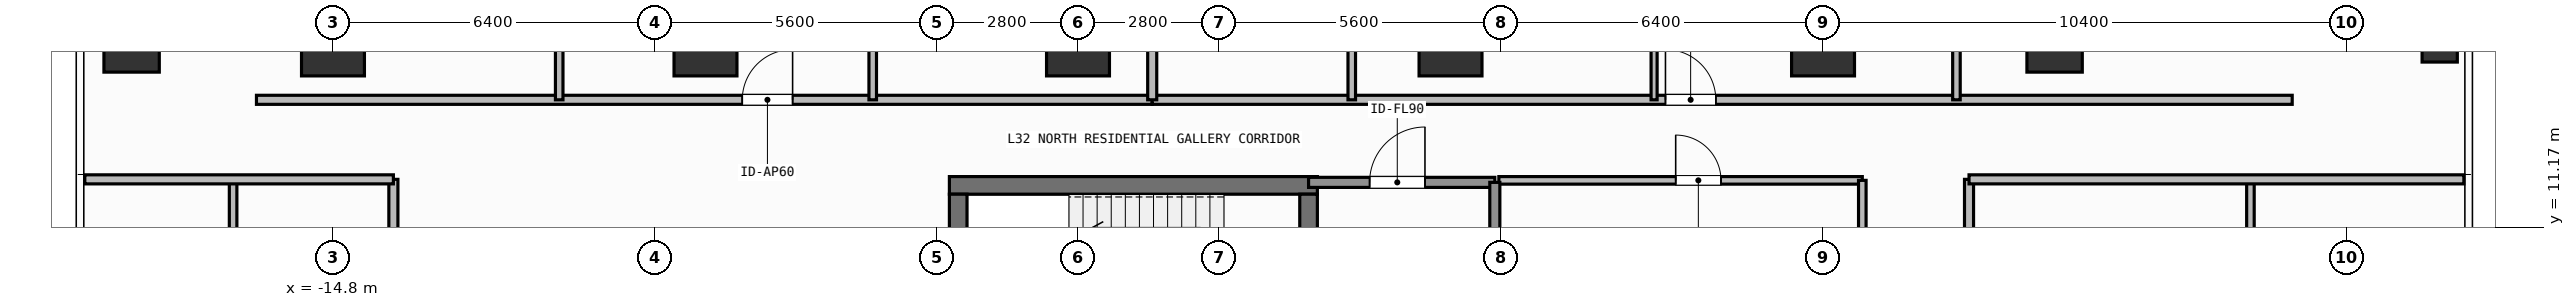
"""IFC4 building model, lengths in metres.
Left out: names, types, materials, properties, quantities, classifications, styles, units other than length and angle.
Written with IfcOpenShell. Run it as: python <this file> out.ifc"""

import sys

from ifc_helpers import new_model, si_unit, direction, frame, frame_2d, origin, origin_2d, place, context, subcontext, project, spatial, rectangle, hollow_rectangle, extrude, element, fill, save


model = new_model("IFC4")
c1 = context("Model", 3, precision=1e-05, world=origin(), true_north=direction((0.0, 1.0)))
c2 = subcontext(c1, "Body", "Model", "MODEL_VIEW")
j1 = project(units=[si_unit("LENGTHUNIT", "METRE"), si_unit("PLANEANGLEUNIT", "RADIAN")], contexts=[c1])
p1 = place(None, origin())
s1 = spatial("IfcSite", under=j1, at=p1, CompositionType="ELEMENT")
p2 = place(p1, origin())
s2 = spatial("IfcBuilding", under=s1, at=p2, CompositionType="ELEMENT")
p3 = place(p2, frame((0.0, 0.0, 129.0)))
s3 = spatial("IfcBuildingStorey", under=s2, at=p3, CompositionType="ELEMENT", Elevation=129.0)
p4 = place(p3, frame((-2.555, 12.0, 0.0), z_axis=(0.0, 0.0, 1.0), x_axis=(1.0, 0.0, 0.0)))
e1 = element("IfcWall", 1, at=p4, inside=s3, PredefinedType="SHEAR", context=c2, shape_type="SweptSolid", body=[
    extrude(rectangle(XDim=7.31, YDim=0.35, at=frame_2d((3.655, 0.0))), origin(), (0.0, 0.0, 1.0), 3.9),
])
p5 = place(p3, frame((-2.38, 8.9, 0.0), z_axis=(0.0, 0.0, 1.0), x_axis=(0.0, 1.0, 0.0)))
e2 = element("IfcWall", 2, at=p5, inside=s3, PredefinedType="SHEAR", context=c2, shape_type="SweptSolid", body=[
    extrude(rectangle(XDim=2.925, YDim=0.35, at=frame_2d((1.462, 0.0))), origin(), (0.0, 0.0, 1.0), 3.9),
])
p6 = place(p3, frame((4.58, 11.825, 0.0), z_axis=(0.0, 0.0, 1.0), x_axis=(0.0, -1.0, 0.0)))
e3 = element("IfcWall", 3, at=p6, inside=s3, PredefinedType="SHEAR", context=c2, shape_type="SweptSolid", body=[
    extrude(rectangle(XDim=2.925, YDim=0.35, at=frame_2d((1.462, 0.0))), origin(), (0.0, 0.0, 1.0), 3.9),
])
p7 = place(p6, frame((0.913, 0.0, 0.0)))
e4 = element("IfcOpeningElement", 4, at=p7, cuts=e3, PredefinedType="OPENING", context=c2, shape_type="SweptSolid", body=[
    extrude(rectangle(XDim=1.1, YDim=2.15, at=frame_2d((0.55, 1.075))), frame((0.0, 0.185, 0.0), z_axis=(0.0, -1.0, 0.0), x_axis=(1.0, 0.0, 0.0)), (0.0, 0.0, 1.0), 0.37),
])
for number, where, z_axis, x_axis in (
    (5, (-14.8, 14.8, 0.0), (0.0, 0.0, 1.0), (1.0, 0.0, 0.0)),
    (6, (-7.4, 14.8, 0.0), (0.0, 0.0, 1.0), (1.0, 0.0, 0.0)),
    (7, (0.0, 14.8, 0.0), (0.0, 0.0, 1.0), (1.0, 0.0, 0.0)),
    (8, (7.4, 14.8, 0.0), (0.0, 0.0, 1.0), (1.0, 0.0, 0.0)),
    (9, (14.8, 14.8, 0.0), (0.0, 0.0, 1.0), (1.0, 0.0, 0.0)),
):
    element("IfcColumn", number, at=place(p3, frame(where, z_axis=z_axis, x_axis=x_axis)), inside=s3, PredefinedType="COLUMN", context=c2, shape_type="SweptSolid", body=[
        extrude(rectangle(XDim=1.25, YDim=1.25, at=origin_2d()), origin(), (0.0, 0.0, 1.0), 3.9),
    ])
for number, where, z_axis, x_axis in (
    (10, (-18.8, 14.8, 0.0), (0.0, 0.0, 1.0), (1.0, 0.0, 0.0)),
    (11, (19.4, 14.8, 0.0), (0.0, 0.0, 1.0), (1.0, 0.0, 0.0)),
):
    element("IfcColumn", number, at=place(p3, frame(where, z_axis=z_axis, x_axis=x_axis)), inside=s3, PredefinedType="COLUMN", context=c2, shape_type="SweptSolid", body=[
        extrude(rectangle(XDim=1.1, YDim=1.1, at=origin_2d()), origin(), (0.0, 0.0, 1.0), 3.9),
    ])
p8 = place(p3, frame((27.05, 14.8, 0.0), z_axis=(0.0, 0.0, 1.0), x_axis=(1.0, 0.0, 0.0)))
e12 = element("IfcColumn", 12, at=p8, inside=s3, PredefinedType="COLUMN", context=c2, shape_type="SweptSolid", body=[
    extrude(hollow_rectangle(XDim=0.7, YDim=0.7, WallThickness=0.032, at=origin_2d()), origin(), (0.0, 0.0, 1.0), 3.9),
])
p9 = place(p3, frame((4.58, 12.06, 0.0), z_axis=(0.0, 0.0, 1.0), x_axis=(1.0, 0.0, 0.0)))
e13 = element("IfcWall", 13, at=p9, inside=s3, PredefinedType="SOLIDWALL", context=c2, shape_type="SweptSolid", body=[
    extrude(rectangle(XDim=3.7, YDim=0.2, at=frame_2d((1.85, 0.0))), origin(), (0.0, 0.0, 1.0), 3.68),
])
p10 = place(p9, frame((1.212, 0.0, 0.0)))
e14 = element("IfcOpeningElement", 14, at=p10, cuts=e13, PredefinedType="OPENING", context=c2, shape_type="SweptSolid", body=[
    extrude(rectangle(XDim=1.1, YDim=2.15, at=frame_2d((0.55, 1.075))), frame((0.0, 0.11, 0.0), z_axis=(0.0, -1.0, 0.0), x_axis=(1.0, 0.0, 0.0)), (0.0, 0.0, 1.0), 0.22),
])
p11 = place(p3, frame((8.36, 12.1, 0.0), z_axis=(0.0, 0.0, 1.0), x_axis=(1.0, 0.0, 0.0)))
e15 = element("IfcWall", 15, at=p11, inside=s3, PredefinedType="PARTITIONING", context=c2, shape_type="SweptSolid", body=[
    extrude(rectangle(XDim=7.22, YDim=0.15, at=frame_2d((3.61, 0.0))), origin(), (0.0, 0.0, 1.0), 3.68),
])
p12 = place(p11, frame((3.513, 0.0, 0.0)))
e16 = element("IfcOpeningElement", 16, at=p12, cuts=e15, PredefinedType="OPENING", context=c2, shape_type="SweptSolid", body=[
    extrude(rectangle(XDim=0.9, YDim=2.1, at=frame_2d((0.45, 1.05))), frame((0.0, 0.085, 0.0), z_axis=(0.0, -1.0, 0.0), x_axis=(1.0, 0.0, 0.0)), (0.0, 0.0, 1.0), 0.17),
])
p13 = place(p3, frame((-16.32, 13.7, 0.0), z_axis=(0.0, 0.0, 1.0), x_axis=(1.0, 0.0, 0.0)))
e17 = element("IfcWall", 17, at=p13, inside=s3, PredefinedType="PARTITIONING", context=c2, shape_type="SweptSolid", body=[
    extrude(rectangle(XDim=17.794, YDim=0.18, at=frame_2d((8.897, 0.0))), origin(), (0.0, 0.0, 1.0), 3.68),
])
p14 = place(p13, frame((9.65, 0.0, 0.0)))
e18 = element("IfcOpeningElement", 18, at=p14, cuts=e17, PredefinedType="OPENING", context=c2, shape_type="SweptSolid", body=[
    extrude(rectangle(XDim=1.0, YDim=2.2, at=frame_2d((0.5, 1.1))), frame((0.0, 0.1, 0.0), z_axis=(0.0, -1.0, 0.0), x_axis=(1.0, 0.0, 0.0)), (0.0, 0.0, 1.0), 0.2),
])
p15 = place(p3, frame((-10.306, 13.7, 0.0), z_axis=(0.0, 0.0, 1.0), x_axis=(0.0, 1.0, 0.0)))
e19 = element("IfcWall", 19, at=p15, inside=s3, PredefinedType="PARTITIONING", context=c2, shape_type="SweptSolid", body=[
    extrude(rectangle(XDim=5.653, YDim=0.15, at=frame_2d((2.827, 0.0))), origin(), (0.0, 0.0, 1.0), 3.68),
])
p16 = place(p15, frame((2.312, 0.0, 0.0)))
e20 = element("IfcOpeningElement", 20, at=p16, cuts=e19, PredefinedType="OPENING", context=c2, shape_type="SweptSolid", body=[
    extrude(rectangle(XDim=0.85, YDim=2.1, at=frame_2d((0.425, 1.05))), frame((0.0, 0.085, 0.0), z_axis=(0.0, -1.0, 0.0), x_axis=(1.0, 0.0, 0.0)), (0.0, 0.0, 1.0), 0.17),
])
p17 = place(p3, frame((-4.078, 13.7, 0.0), z_axis=(0.0, 0.0, 1.0), x_axis=(0.0, 1.0, 0.0)))
e21 = element("IfcWall", 21, at=p17, inside=s3, PredefinedType="PARTITIONING", context=c2, shape_type="SweptSolid", body=[
    extrude(rectangle(XDim=3.102, YDim=0.15, at=frame_2d((1.551, 0.0))), origin(), (0.0, 0.0, 1.0), 3.68),
])
p18 = place(p17, frame((1.214, 0.0, 0.0)))
e22 = element("IfcOpeningElement", 22, at=p18, cuts=e21, PredefinedType="OPENING", context=c2, shape_type="SweptSolid", body=[
    extrude(rectangle(XDim=0.85, YDim=2.1, at=frame_2d((0.425, 1.05))), frame((0.0, 0.085, 0.0), z_axis=(0.0, -1.0, 0.0), x_axis=(1.0, 0.0, 0.0)), (0.0, 0.0, 1.0), 0.17),
])
p19 = place(p3, frame((1.474, 13.7, 0.0), z_axis=(0.0, 0.0, 1.0), x_axis=(1.0, 0.0, 0.0)))
e23 = element("IfcWall", 23, at=p19, inside=s3, PredefinedType="PARTITIONING", context=c2, shape_type="SweptSolid", body=[
    extrude(rectangle(XDim=22.646, YDim=0.18, at=frame_2d((11.323, 0.0))), origin(), (0.0, 0.0, 1.0), 3.68),
])
p20 = place(p19, frame((10.196, 0.0, 0.0)))
e24 = element("IfcOpeningElement", 24, at=p20, cuts=e23, PredefinedType="OPENING", context=c2, shape_type="SweptSolid", body=[
    extrude(rectangle(XDim=1.0, YDim=2.2, at=frame_2d((0.5, 1.1))), frame((0.0, 0.1, 0.0), z_axis=(0.0, -1.0, 0.0), x_axis=(1.0, 0.0, 0.0)), (0.0, 0.0, 1.0), 0.2),
])
p21 = place(p3, frame((11.444, 13.7, 0.0), z_axis=(0.0, 0.0, 1.0), x_axis=(0.0, 1.0, 0.0)))
e25 = element("IfcWall", 25, at=p21, inside=s3, PredefinedType="PARTITIONING", context=c2, shape_type="SweptSolid", body=[
    extrude(rectangle(XDim=11.49, YDim=0.12, at=frame_2d((5.745, 0.0))), origin(), (0.0, 0.0, 1.0), 3.68),
])
p22 = place(p21, frame((5.295, 0.0, 0.0)))
e26 = element("IfcOpeningElement", 26, at=p22, cuts=e25, PredefinedType="OPENING", context=c2, shape_type="SweptSolid", body=[
    extrude(rectangle(XDim=0.9, YDim=2.1, at=frame_2d((0.45, 1.05))), frame((0.0, 0.07, 0.0), z_axis=(0.0, -1.0, 0.0), x_axis=(1.0, 0.0, 0.0)), (0.0, 0.0, 1.0), 0.14),
])
p23 = place(p3, frame((5.438, 13.7, 0.0), z_axis=(0.0, 0.0, 1.0), x_axis=(0.0, 1.0, 0.0)))
e27 = element("IfcWall", 27, at=p23, inside=s3, PredefinedType="PARTITIONING", context=c2, shape_type="SweptSolid", body=[
    extrude(rectangle(XDim=6.664, YDim=0.15, at=frame_2d((3.332, 0.0))), origin(), (0.0, 0.0, 1.0), 3.68),
])
p24 = place(p23, frame((2.818, 0.0, 0.0)))
e28 = element("IfcOpeningElement", 28, at=p24, cuts=e27, PredefinedType="OPENING", context=c2, shape_type="SweptSolid", body=[
    extrude(rectangle(XDim=0.85, YDim=2.1, at=frame_2d((0.425, 1.05))), frame((0.0, 0.085, 0.0), z_axis=(0.0, -1.0, 0.0), x_axis=(1.0, 0.0, 0.0)), (0.0, 0.0, 1.0), 0.17),
])
p25 = place(p3, frame((17.45, 13.7, 0.0), z_axis=(0.0, 0.0, 1.0), x_axis=(0.0, 1.0, 0.0)))
e29 = element("IfcWall", 29, at=p25, inside=s3, PredefinedType="PARTITIONING", context=c2, shape_type="SweptSolid", body=[
    extrude(rectangle(XDim=3.102, YDim=0.15, at=frame_2d((1.551, 0.0))), origin(), (0.0, 0.0, 1.0), 3.68),
])
p26 = place(p25, frame((1.741, 0.0, 0.0)))
e30 = element("IfcOpeningElement", 30, at=p26, cuts=e29, PredefinedType="OPENING", context=c2, shape_type="SweptSolid", body=[
    extrude(rectangle(XDim=0.85, YDim=2.1, at=frame_2d((0.425, 1.05))), frame((0.0, 0.085, 0.0), z_axis=(0.0, -1.0, 0.0), x_axis=(1.0, 0.0, 0.0)), (0.0, 0.0, 1.0), 0.17),
])
p27 = place(p3, frame((-13.6, -12.12, 0.0), z_axis=(0.0, 0.0, 1.0), x_axis=(0.0, 1.0, 0.0)))
e31 = element("IfcWall", 31, at=p27, inside=s3, PredefinedType="PARTITIONING", context=c2, shape_type="SweptSolid", body=[
    extrude(rectangle(XDim=24.24, YDim=0.18, at=frame_2d((12.12, 0.0))), origin(), (0.0, 0.0, 1.0), 3.68),
])
p28 = place(p27, frame((11.62, 0.0, 0.0)))
e32 = element("IfcOpeningElement", 32, at=p28, cuts=e31, PredefinedType="OPENING", context=c2, shape_type="SweptSolid", body=[
    extrude(rectangle(XDim=1.0, YDim=2.2, at=frame_2d((0.5, 1.1))), frame((0.0, 0.1, 0.0), z_axis=(0.0, -1.0, 0.0), x_axis=(1.0, 0.0, 0.0)), (0.0, 0.0, 1.0), 0.2),
])
p29 = place(p3, frame((17.7, 1.309, 0.0), z_axis=(0.0, 0.0, 1.0), x_axis=(0.0, 1.0, 0.0)))
e33 = element("IfcWall", 33, at=p29, inside=s3, PredefinedType="PARTITIONING", context=c2, shape_type="SweptSolid", body=[
    extrude(rectangle(XDim=10.811, YDim=0.18, at=frame_2d((5.406, 0.0))), origin(), (0.0, 0.0, 1.0), 3.68),
])
p30 = place(p29, frame((4.458, 0.0, 0.0)))
e34 = element("IfcOpeningElement", 34, at=p30, cuts=e33, PredefinedType="OPENING", context=c2, shape_type="SweptSolid", body=[
    extrude(rectangle(XDim=1.0, YDim=2.2, at=frame_2d((0.5, 1.1))), frame((0.0, 0.1, 0.0), z_axis=(0.0, -1.0, 0.0), x_axis=(1.0, 0.0, 0.0)), (0.0, 0.0, 1.0), 0.2),
])
p31 = place(p3, frame((8.28, 8.875, 0.0), z_axis=(0.0, 0.0, 1.0), x_axis=(0.0, 1.0, 0.0)))
e35 = element("IfcWall", 35, at=p31, inside=s3, PredefinedType="SOLIDWALL", context=c2, shape_type="SweptSolid", body=[
    extrude(rectangle(XDim=3.185, YDim=0.2, at=frame_2d((1.593, 0.0))), origin(), (0.0, 0.0, 1.0), 3.68),
])
p32 = place(p3, frame((15.58, 5.85, 0.0), z_axis=(0.0, 0.0, 1.0), x_axis=(0.0, 1.0, 0.0)))
e36 = element("IfcWall", 36, at=p32, inside=s3, PredefinedType="PARTITIONING", context=c2, shape_type="SweptSolid", body=[
    extrude(rectangle(XDim=6.25, YDim=0.15, at=frame_2d((3.125, 0.0))), origin(), (0.0, 0.0, 1.0), 3.68),
])
p33 = place(p3, frame((1.474, 13.7, 0.0), z_axis=(0.0, 0.0, 1.0), x_axis=(0.0, 1.0, 0.0)))
e37 = element("IfcWall", 37, at=p33, inside=s3, PredefinedType="PARTITIONING", context=c2, shape_type="SweptSolid", body=[
    extrude(rectangle(XDim=15.73, YDim=0.18, at=frame_2d((7.865, 0.0))), origin(), (0.0, 0.0, 1.0), 3.68),
])
p34 = place(p3, frame((-16.784, 5.449, 0.0), z_axis=(0.0, 0.0, 1.0), x_axis=(0.0, 1.0, 0.0)))
e38 = element("IfcWall", 38, at=p34, inside=s3, PredefinedType="PARTITIONING", context=c2, shape_type="SweptSolid", body=[
    extrude(rectangle(XDim=6.671, YDim=0.15, at=frame_2d((3.335, 0.0))), origin(), (0.0, 0.0, 1.0), 3.68),
])
p35 = place(p3, frame((-19.73, 12.12, 0.0), z_axis=(0.0, 0.0, 1.0), x_axis=(1.0, 0.0, 0.0)))
e39 = element("IfcWall", 39, at=p35, inside=s3, PredefinedType="PARTITIONING", context=c2, shape_type="SweptSolid", body=[
    extrude(rectangle(XDim=6.13, YDim=0.18, at=frame_2d((3.065, 0.0))), origin(), (0.0, 0.0, 1.0), 3.68),
])
p36 = place(p3, frame((23.29, 9.32, 0.0), z_axis=(0.0, 0.0, 1.0), x_axis=(0.0, 1.0, 0.0)))
e40 = element("IfcWall", 40, at=p36, inside=s3, PredefinedType="PARTITIONING", context=c2, shape_type="SweptSolid", body=[
    extrude(rectangle(XDim=2.8, YDim=0.15, at=frame_2d((1.4, 0.0))), origin(), (0.0, 0.0, 1.0), 3.68),
])
p37 = place(p3, frame((17.7, 12.12, 0.0), z_axis=(0.0, 0.0, 1.0), x_axis=(1.0, 0.0, 0.0)))
e41 = element("IfcWall", 41, at=p37, inside=s3, PredefinedType="PARTITIONING", context=c2, shape_type="SweptSolid", body=[
    extrude(rectangle(XDim=9.83, YDim=0.18, at=frame_2d((4.915, 0.0))), origin(), (0.0, 0.0, 1.0), 3.68),
])
p38 = place(p10, origin())
e42 = element("IfcDoor", 42, at=p38, inside=s3, OperationType="SINGLE_SWING_RIGHT", PredefinedType="DOOR", context=c2, shape_type="SweptSolid", body=[
    extrude(rectangle(XDim=1.1, YDim=2.15, at=frame_2d((0.55, 1.075))), frame((0.0, 0.025, 0.0), z_axis=(0.0, -1.0, 0.0), x_axis=(1.0, 0.0, 0.0)), (0.0, 0.0, 1.0), 0.05),
])
fill(e14, e42)
p39 = place(p12, origin())
e43 = element("IfcDoor", 43, at=p39, inside=s3, OperationType="SINGLE_SWING_LEFT", PredefinedType="DOOR", context=c2, shape_type="SweptSolid", body=[
    extrude(rectangle(XDim=0.9, YDim=2.1, at=frame_2d((0.45, 1.05))), frame((0.0, 0.025, 0.0), z_axis=(0.0, -1.0, 0.0), x_axis=(1.0, 0.0, 0.0)), (0.0, 0.0, 1.0), 0.05),
])
fill(e16, e43)
p40 = place(p14, origin())
e44 = element("IfcDoor", 44, at=p40, inside=s3, OperationType="SINGLE_SWING_RIGHT", PredefinedType="DOOR", context=c2, shape_type="SweptSolid", body=[
    extrude(rectangle(XDim=1.0, YDim=2.2, at=frame_2d((0.5, 1.1))), frame((0.0, 0.025, 0.0), z_axis=(0.0, -1.0, 0.0), x_axis=(1.0, 0.0, 0.0)), (0.0, 0.0, 1.0), 0.05),
])
fill(e18, e44)
p41 = place(p20, origin())
e45 = element("IfcDoor", 45, at=p41, inside=s3, OperationType="SINGLE_SWING_LEFT", PredefinedType="DOOR", context=c2, shape_type="SweptSolid", body=[
    extrude(rectangle(XDim=1.0, YDim=2.2, at=frame_2d((0.5, 1.1))), frame((0.0, 0.025, 0.0), z_axis=(0.0, -1.0, 0.0), x_axis=(1.0, 0.0, 0.0)), (0.0, 0.0, 1.0), 0.05),
])
fill(e24, e45)
save(model, sys.argv[1])
